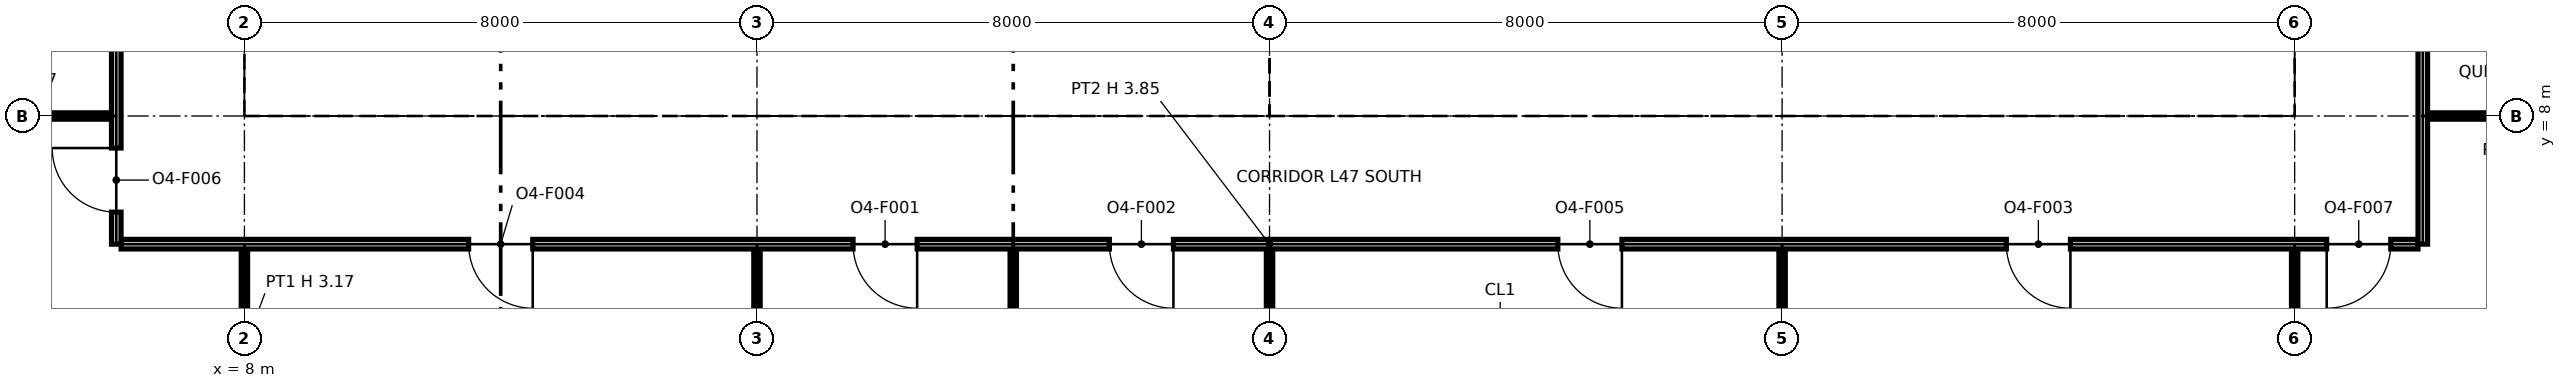
"""IFC4 building model, lengths in metres.
Left out: names, types, materials, properties, quantities, classifications, styles, units other than length and angle.
Written with IfcOpenShell. Run it as: python <this file> out.ifc"""

import sys

from ifc_helpers import new_model, si_unit, direction, frame, frame_2d, origin, origin_2d, place, context, subcontext, project, spatial, polyline, rectangle, i_section, outline, extrude, element, fill, save


model = new_model("IFC4")
c1 = context("Model", 3, precision=1e-05, world=origin(), true_north=direction((0.0, 1.0)))
c2 = subcontext(c1, "Body", "Model", "MODEL_VIEW")
j1 = project(units=[si_unit("LENGTHUNIT", "METRE"), si_unit("PLANEANGLEUNIT", "RADIAN")], contexts=[c1])
p1 = place(None, origin())
s1 = spatial("IfcSite", under=j1, at=p1, CompositionType="ELEMENT")
p2 = place(p1, origin())
s2 = spatial("IfcBuilding", under=s1, at=p2, CompositionType="ELEMENT")
p3 = place(p2, frame((0.0, 0.0, 221.0)))
s3 = spatial("IfcBuildingStorey", under=s2, at=p3, CompositionType="ELEMENT", Elevation=221.0)
for number, where, z_axis, x_axis in (
    (1, (8.0, 8.0, 0.0), (0.0, 0.0, 1.0), (1.0, 0.0, 0.0)),
    (2, (16.0, 8.0, 0.0), (0.0, 0.0, 1.0), (1.0, 0.0, 0.0)),
):
    element("IfcColumn", number, at=place(p3, frame(where, z_axis=z_axis, x_axis=x_axis)), inside=s3, PredefinedType="COLUMN", context=c2, shape_type="SweptSolid", body=[
        extrude(i_section(OverallWidth=0.373, OverallDepth=0.368, WebThickness=0.015, FlangeThickness=0.024, at=origin_2d()), origin(), (0.0, 0.0, 1.0), 3.85),
    ])
p4 = place(p3, frame((24.0, 8.0, 0.0), z_axis=(0.0, 0.0, 1.0), x_axis=(1.0, 0.0, 0.0)))
e3 = element("IfcColumn", 3, at=p4, inside=s3, PredefinedType="COLUMN", context=c2, shape_type="SweptSolid", body=[
    extrude(i_section(OverallWidth=0.394, OverallDepth=0.376, WebThickness=0.017, FlangeThickness=0.028, at=origin_2d()), origin(), (0.0, 0.0, 1.0), 3.85),
])
for number, where, z_axis, x_axis in (
    (4, (32.0, 8.0, 0.0), (0.0, 0.0, 1.0), (1.0, 0.0, 0.0)),
    (5, (40.0, 8.0, 0.0), (0.0, 0.0, 1.0), (1.0, 0.0, 0.0)),
):
    element("IfcColumn", number, at=place(p3, frame(where, z_axis=z_axis, x_axis=x_axis)), inside=s3, PredefinedType="COLUMN", context=c2, shape_type="SweptSolid", body=[
        extrude(i_section(OverallWidth=0.373, OverallDepth=0.368, WebThickness=0.015, FlangeThickness=0.024, at=origin_2d()), origin(), (0.0, 0.0, 1.0), 3.85),
    ])
p5 = place(p3, frame((8.65, 8.75, 0.0), z_axis=(0.0, 0.0, 1.0), x_axis=(1.0, 0.0, 0.0)))
e6 = element("IfcWall", 6, at=p5, inside=s3, PredefinedType="PARTITIONING", context=c2, shape_type="SweptSolid", body=[
    extrude(outline(polyline([(0.0, 0.0), (14.7, 0.0), (14.7, 3.85), (7.438, 3.85), (7.438, 3.308), (7.262, 3.308), (7.261, 3.85), (0.0, 3.85), (0.0, 0.0)])), frame((0.0, 0.1, 0.0), z_axis=(0.0, -1.0, 0.0), x_axis=(1.0, 0.0, 0.0)), (0.0, 0.0, 1.0), 0.2),
])
p6 = place(p5, frame((1.3, 0.0, 0.0)))
e7 = element("IfcOpeningElement", 7, at=p6, cuts=e6, PredefinedType="OPENING", context=c2, shape_type="SweptSolid", body=[
    extrude(rectangle(XDim=1.4, YDim=2.1, at=frame_2d((0.7, 1.05))), frame((0.0, 0.11, 0.0), z_axis=(0.0, -1.0, 0.0), x_axis=(1.0, 0.0, 0.0)), (0.0, 0.0, 1.0), 0.22),
])
p7 = place(p5, frame((4.6, 0.0, 0.0)))
e8 = element("IfcOpeningElement", 8, at=p7, cuts=e6, PredefinedType="OPENING", context=c2, shape_type="SweptSolid", body=[
    extrude(rectangle(XDim=1.4, YDim=2.1, at=frame_2d((0.7, 1.05))), frame((0.0, 0.11, 0.0), z_axis=(0.0, -1.0, 0.0), x_axis=(1.0, 0.0, 0.0)), (0.0, 0.0, 1.0), 0.22),
])
p8 = place(p5, frame((10.4, 0.0, 0.0)))
e9 = element("IfcOpeningElement", 9, at=p8, cuts=e6, PredefinedType="OPENING", context=c2, shape_type="SweptSolid", body=[
    extrude(rectangle(XDim=1.2, YDim=2.1, at=frame_2d((0.6, 1.05))), frame((0.0, 0.11, 0.0), z_axis=(0.0, -1.0, 0.0), x_axis=(1.0, 0.0, 0.0)), (0.0, 0.0, 1.0), 0.22),
])
p9 = place(p3, frame((8.75, 8.85, 0.0), z_axis=(0.0, 0.0, 1.0), x_axis=(0.0, 1.0, 0.0)))
e10 = element("IfcWall", 10, at=p9, inside=s3, PredefinedType="PARTITIONING", context=c2, shape_type="SweptSolid", body=[
    extrude(outline(polyline([(0.0, 0.0), (14.3, 0.0), (14.3, 3.85), (10.225, 3.85), (10.224, 3.44), (10.076, 3.44), (10.075, 3.85), (7.239, 3.85), (7.238, 3.308), (7.062, 3.308), (7.062, 3.85), (0.0, 3.85), (0.0, 0.0)])), frame((0.0, 0.1, 0.0), z_axis=(0.0, -1.0, 0.0), x_axis=(1.0, 0.0, 0.0)), (0.0, 0.0, 1.0), 0.2),
])
p10 = place(p9, frame((8.3, 0.0, 0.0)))
e11 = element("IfcOpeningElement", 11, at=p10, cuts=e10, PredefinedType="OPENING", context=c2, shape_type="SweptSolid", body=[
    extrude(rectangle(XDim=1.8, YDim=2.1, at=frame_2d((0.9, 1.05))), frame((0.0, 0.11, 0.0), z_axis=(0.0, -1.0, 0.0), x_axis=(1.0, 0.0, 0.0)), (0.0, 0.0, 1.0), 0.22),
])
p11 = place(p3, frame((12.4, 8.85, 0.0), z_axis=(0.0, 0.0, 1.0), x_axis=(0.0, 1.0, 0.0)))
e12 = element("IfcWall", 12, at=p11, inside=s3, PredefinedType="PARTITIONING", context=c2, shape_type="SweptSolid", body=[
    extrude(rectangle(XDim=6.85, YDim=0.2, at=frame_2d((3.425, 0.0))), origin(), (0.0, 0.0, 1.0), 3.85),
])
p12 = place(p3, frame((15.85, 8.85, 0.0), z_axis=(0.0, 0.0, 1.0), x_axis=(0.0, 1.0, 0.0)))
e13 = element("IfcWall", 13, at=p12, inside=s3, PredefinedType="PARTITIONING", context=c2, shape_type="SweptSolid", body=[
    extrude(rectangle(XDim=1.55, YDim=0.9, at=frame_2d((0.775, 0.0))), origin(), (0.0, 0.0, 1.0), 3.308),
])
p13 = place(p12, frame((0.3, 0.0, 0.0)))
e14 = element("IfcOpeningElement", 14, at=p13, cuts=e13, PredefinedType="OPENING", context=c2, shape_type="SweptSolid", body=[
    extrude(rectangle(XDim=1.1, YDim=2.1, at=frame_2d((0.55, 1.05))), frame((0.0, 0.46, 0.0), z_axis=(0.0, -1.0, 0.0), x_axis=(1.0, 0.0, 0.0)), (0.0, 0.0, 1.0), 0.92),
])
p14 = place(p3, frame((23.25, 8.85, 0.0), z_axis=(0.0, 0.0, 1.0), x_axis=(0.0, 1.0, 0.0)))
e15 = element("IfcWall", 15, at=p14, inside=s3, PredefinedType="PARTITIONING", context=c2, shape_type="SweptSolid", body=[
    extrude(outline(polyline([(0.0, 0.0), (14.3, 0.0), (14.3, 3.85), (10.225, 3.85), (10.224, 3.44), (10.076, 3.44), (10.075, 3.85), (7.239, 3.85), (7.238, 3.308), (7.062, 3.308), (7.062, 3.85), (5.225, 3.85), (5.224, 3.44), (5.076, 3.44), (5.075, 3.85), (0.0, 3.85), (0.0, 0.0)])), frame((0.0, 0.1, 0.0), z_axis=(0.0, -1.0, 0.0), x_axis=(1.0, 0.0, 0.0)), (0.0, 0.0, 1.0), 0.2),
])
p15 = place(p14, frame((8.3, 0.0, 0.0)))
e16 = element("IfcOpeningElement", 16, at=p15, cuts=e15, PredefinedType="OPENING", context=c2, shape_type="SweptSolid", body=[
    extrude(rectangle(XDim=1.8, YDim=2.1, at=frame_2d((0.9, 1.05))), frame((0.0, 0.11, 0.0), z_axis=(0.0, -1.0, 0.0), x_axis=(1.0, 0.0, 0.0)), (0.0, 0.0, 1.0), 0.22),
])
p16 = place(p3, frame((24.65, 8.75, 0.0), z_axis=(0.0, 0.0, 1.0), x_axis=(1.0, 0.0, 0.0)))
e17 = element("IfcWall", 17, at=p16, inside=s3, PredefinedType="PARTITIONING", context=c2, shape_type="SweptSolid", body=[
    extrude(outline(polyline([(0.0, 0.0), (14.7, 0.0), (14.7, 3.85), (7.438, 3.85), (7.438, 3.308), (7.262, 3.308), (7.261, 3.85), (0.0, 3.85), (0.0, 0.0)])), frame((0.0, 0.1, 0.0), z_axis=(0.0, -1.0, 0.0), x_axis=(1.0, 0.0, 0.0)), (0.0, 0.0, 1.0), 0.2),
])
p17 = place(p3, frame((24.75, 8.85, 0.0), z_axis=(0.0, 0.0, 1.0), x_axis=(0.0, 1.0, 0.0)))
e18 = element("IfcWall", 18, at=p17, inside=s3, PredefinedType="PARTITIONING", context=c2, shape_type="SweptSolid", body=[
    extrude(outline(polyline([(0.0, 0.0), (6.3, 0.0), (6.3, 3.85), (3.225, 3.85), (3.224, 3.44), (3.076, 3.44), (3.075, 3.85), (0.0, 3.85), (0.0, 0.0)])), frame((0.0, 0.1, 0.0), z_axis=(0.0, -1.0, 0.0), x_axis=(1.0, 0.0, 0.0)), (0.0, 0.0, 1.0), 0.2),
])
for number, where, z_axis, x_axis in (
    (19, (27.2, 8.85, 0.0), (0.0, 0.0, 1.0), (0.0, 1.0, 0.0)),
    (20, (29.5, 8.85, 0.0), (0.0, 0.0, 1.0), (0.0, 1.0, 0.0)),
):
    element("IfcWall", number, at=place(p3, frame(where, z_axis=z_axis, x_axis=x_axis)), inside=s3, PredefinedType="PARTITIONING", context=c2, shape_type="SweptSolid", body=[
        extrude(rectangle(XDim=2.55, YDim=0.2, at=frame_2d((1.275, 0.0))), origin(), (0.0, 0.0, 1.0), 3.85),
    ])
p18 = place(p3, frame((32.0, 8.85, 0.0), z_axis=(0.0, 0.0, 1.0), x_axis=(0.0, 1.0, 0.0)))
e21 = element("IfcWall", 21, at=p18, inside=s3, PredefinedType="PARTITIONING", context=c2, shape_type="SweptSolid", body=[
    extrude(rectangle(XDim=2.55, YDim=0.6, at=frame_2d((1.275, 0.0))), origin(), (0.0, 0.0, 1.0), 3.308),
])
for number, where, z_axis, x_axis in (
    (22, (35.6, 8.85, 0.0), (0.0, 0.0, 1.0), (0.0, 1.0, 0.0)),
    (23, (39.25, 8.85, 0.0), (0.0, 0.0, 1.0), (0.0, 1.0, 0.0)),
):
    element("IfcWall", number, at=place(p3, frame(where, z_axis=z_axis, x_axis=x_axis)), inside=s3, PredefinedType="PARTITIONING", context=c2, shape_type="SweptSolid", body=[
        extrude(rectangle(XDim=6.3, YDim=0.2, at=frame_2d((3.15, 0.0))), origin(), (0.0, 0.0, 1.0), 3.85),
    ])
p19 = place(p3, frame((20.0, 0.13, 0.0), z_axis=(0.0, 0.0, 1.0), x_axis=(0.0, 1.0, 0.0)))
e24 = element("IfcWall", 24, at=p19, inside=s3, PredefinedType="PARTITIONING", context=c2, shape_type="SweptSolid", body=[
    extrude(outline(polyline([(0.0, 0.0), (5.795, 0.0), (5.795, 3.85), (4.17, 3.85), (4.168, 3.172), (3.572, 3.172), (3.57, 3.85), (0.0, 3.85), (0.0, 0.0)])), frame((0.0, 0.05, 0.0), z_axis=(0.0, -1.0, 0.0), x_axis=(1.0, 0.0, 0.0)), (0.0, 0.0, 1.0), 0.1),
])
p20 = place(p3, frame((40.0, 0.13, 0.0), z_axis=(0.0, 0.0, 1.0), x_axis=(0.0, 1.0, 0.0)))
e25 = element("IfcWall", 25, at=p20, inside=s3, PredefinedType="PARTITIONING", context=c2, shape_type="SweptSolid", body=[
    extrude(rectangle(XDim=5.795, YDim=0.1, at=frame_2d((2.897, 0.0))), origin(), (0.0, 0.0, 1.0), 3.172),
])
for number, where, z_axis, x_axis in (
    (26, (8.0, 2.83, 0.0), (0.0, 0.0, 1.0), (0.0, 1.0, 0.0)),
    (27, (16.0, 2.83, 0.0), (0.0, 0.0, 1.0), (0.0, 1.0, 0.0)),
    (28, (24.0, 2.83, 0.0), (0.0, 0.0, 1.0), (0.0, 1.0, 0.0)),
    (29, (32.0, 2.83, 0.0), (0.0, 0.0, 1.0), (0.0, 1.0, 0.0)),
):
    element("IfcWall", number, at=place(p3, frame(where, z_axis=z_axis, x_axis=x_axis)), inside=s3, PredefinedType="PARTITIONING", context=c2, shape_type="SweptSolid", body=[
        extrude(rectangle(XDim=3.095, YDim=0.1, at=frame_2d((1.547, 0.0))), origin(), (0.0, 0.0, 1.0), 3.172),
    ])
p21 = place(p3, frame((6.075, 6.0, 0.0), z_axis=(0.0, 0.0, 1.0), x_axis=(1.0, 0.0, 0.0)))
e30 = element("IfcWall", 30, at=p21, inside=s3, PredefinedType="PARTITIONING", context=c2, shape_type="SweptSolid", body=[
    extrude(rectangle(XDim=35.85, YDim=0.15, at=frame_2d((17.925, 0.0))), origin(), (0.0, 0.0, 1.0), 3.85),
])
p22 = place(p21, frame((12.425, 0.0, 0.0), z_axis=(0.0, 0.0, 1.0), x_axis=(-1.0, 0.0, 0.0)))
e31 = element("IfcOpeningElement", 31, at=p22, cuts=e30, PredefinedType="OPENING", context=c2, shape_type="SweptSolid", body=[
    extrude(rectangle(XDim=1.0, YDim=2.1, at=frame_2d((0.5, 1.05))), frame((0.0, 0.085, 0.0), z_axis=(0.0, -1.0, 0.0), x_axis=(1.0, 0.0, 0.0)), (0.0, 0.0, 1.0), 0.17),
])
p23 = place(p21, frame((16.425, 0.0, 0.0), z_axis=(0.0, 0.0, 1.0), x_axis=(-1.0, 0.0, 0.0)))
e32 = element("IfcOpeningElement", 32, at=p23, cuts=e30, PredefinedType="OPENING", context=c2, shape_type="SweptSolid", body=[
    extrude(rectangle(XDim=1.0, YDim=2.1, at=frame_2d((0.5, 1.05))), frame((0.0, 0.085, 0.0), z_axis=(0.0, -1.0, 0.0), x_axis=(1.0, 0.0, 0.0)), (0.0, 0.0, 1.0), 0.17),
])
p24 = place(p21, frame((30.425, 0.0, 0.0), z_axis=(0.0, 0.0, 1.0), x_axis=(-1.0, 0.0, 0.0)))
e33 = element("IfcOpeningElement", 33, at=p24, cuts=e30, PredefinedType="OPENING", context=c2, shape_type="SweptSolid", body=[
    extrude(rectangle(XDim=1.0, YDim=2.1, at=frame_2d((0.5, 1.05))), frame((0.0, 0.085, 0.0), z_axis=(0.0, -1.0, 0.0), x_axis=(1.0, 0.0, 0.0)), (0.0, 0.0, 1.0), 0.17),
])
p25 = place(p21, frame((6.425, 0.0, 0.0), z_axis=(0.0, 0.0, 1.0), x_axis=(-1.0, 0.0, 0.0)))
e34 = element("IfcOpeningElement", 34, at=p25, cuts=e30, PredefinedType="OPENING", context=c2, shape_type="SweptSolid", body=[
    extrude(rectangle(XDim=1.0, YDim=2.1, at=frame_2d((0.5, 1.05))), frame((0.0, 0.085, 0.0), z_axis=(0.0, -1.0, 0.0), x_axis=(1.0, 0.0, 0.0)), (0.0, 0.0, 1.0), 0.17),
])
p26 = place(p21, frame((23.425, 0.0, 0.0), z_axis=(0.0, 0.0, 1.0), x_axis=(-1.0, 0.0, 0.0)))
e35 = element("IfcOpeningElement", 35, at=p26, cuts=e30, PredefinedType="OPENING", context=c2, shape_type="SweptSolid", body=[
    extrude(rectangle(XDim=1.0, YDim=2.1, at=frame_2d((0.5, 1.05))), frame((0.0, 0.085, 0.0), z_axis=(0.0, -1.0, 0.0), x_axis=(1.0, 0.0, 0.0)), (0.0, 0.0, 1.0), 0.17),
])
p27 = place(p21, frame((35.425, 0.0, 0.0), z_axis=(0.0, 0.0, 1.0), x_axis=(-1.0, 0.0, 0.0)))
e36 = element("IfcOpeningElement", 36, at=p27, cuts=e30, PredefinedType="OPENING", context=c2, shape_type="SweptSolid", body=[
    extrude(rectangle(XDim=1.0, YDim=2.1, at=frame_2d((0.5, 1.05))), frame((0.0, 0.085, 0.0), z_axis=(0.0, -1.0, 0.0), x_axis=(1.0, 0.0, 0.0)), (0.0, 0.0, 1.0), 0.17),
])
p28 = place(p3, frame((6.0, 6.0, 0.0), z_axis=(0.0, 0.0, 1.0), x_axis=(0.0, 1.0, 0.0)))
e37 = element("IfcWall", 37, at=p28, inside=s3, PredefinedType="PARTITIONING", context=c2, shape_type="SweptSolid", body=[
    extrude(outline(polyline([(0.0, 0.0), (13.375, 0.0), (13.375, 3.85), (10.3, 3.85), (10.298, 3.172), (9.702, 3.172), (9.7, 3.85), (6.3, 3.85), (6.298, 3.172), (5.702, 3.172), (5.7, 3.85), (2.3, 3.85), (2.298, 3.172), (1.702, 3.172), (1.7, 3.85), (0.0, 3.85), (0.0, 0.0)])), frame((0.0, 0.075, 0.0), z_axis=(0.0, -1.0, 0.0), x_axis=(1.0, 0.0, 0.0)), (0.0, 0.0, 1.0), 0.15),
])
p29 = place(p28, frame((0.5, 0.0, 0.0)))
e38 = element("IfcOpeningElement", 38, at=p29, cuts=e37, PredefinedType="OPENING", context=c2, shape_type="SweptSolid", body=[
    extrude(rectangle(XDim=1.0, YDim=2.1, at=frame_2d((0.5, 1.05))), frame((0.0, 0.085, 0.0), z_axis=(0.0, -1.0, 0.0), x_axis=(1.0, 0.0, 0.0)), (0.0, 0.0, 1.0), 0.17),
])
p30 = place(p28, frame((3.5, 0.0, 0.0)))
e39 = element("IfcOpeningElement", 39, at=p30, cuts=e37, PredefinedType="OPENING", context=c2, shape_type="SweptSolid", body=[
    extrude(rectangle(XDim=1.0, YDim=2.1, at=frame_2d((0.5, 1.05))), frame((0.0, 0.085, 0.0), z_axis=(0.0, -1.0, 0.0), x_axis=(1.0, 0.0, 0.0)), (0.0, 0.0, 1.0), 0.17),
])
p31 = place(p28, frame((7.5, 0.0, 0.0)))
e40 = element("IfcOpeningElement", 40, at=p31, cuts=e37, PredefinedType="OPENING", context=c2, shape_type="SweptSolid", body=[
    extrude(rectangle(XDim=1.0, YDim=2.1, at=frame_2d((0.5, 1.05))), frame((0.0, 0.085, 0.0), z_axis=(0.0, -1.0, 0.0), x_axis=(1.0, 0.0, 0.0)), (0.0, 0.0, 1.0), 0.17),
])
p32 = place(p28, frame((11.225, 0.0, 0.0)))
e41 = element("IfcOpeningElement", 41, at=p32, cuts=e37, PredefinedType="OPENING", context=c2, shape_type="SweptSolid", body=[
    extrude(rectangle(XDim=1.0, YDim=2.1, at=frame_2d((0.5, 1.05))), frame((0.0, 0.085, 0.0), z_axis=(0.0, -1.0, 0.0), x_axis=(1.0, 0.0, 0.0)), (0.0, 0.0, 1.0), 0.17),
])
p33 = place(p3, frame((42.0, 6.0, 0.0), z_axis=(0.0, 0.0, 1.0), x_axis=(0.0, 1.0, 0.0)))
e42 = element("IfcWall", 42, at=p33, inside=s3, PredefinedType="PARTITIONING", context=c2, shape_type="SweptSolid", body=[
    extrude(outline(polyline([(0.0, 0.0), (11.925, 0.0), (11.925, 3.85), (10.3, 3.85), (10.298, 3.172), (9.702, 3.172), (9.7, 3.85), (6.3, 3.85), (6.298, 3.172), (5.702, 3.172), (5.7, 3.85), (2.3, 3.85), (2.298, 3.172), (1.702, 3.172), (1.7, 3.85), (0.0, 3.85), (0.0, 0.0)])), frame((0.0, 0.075, 0.0), z_axis=(0.0, -1.0, 0.0), x_axis=(1.0, 0.0, 0.0)), (0.0, 0.0, 1.0), 0.15),
])
p34 = place(p33, frame((4.5, 0.0, 0.0), z_axis=(0.0, 0.0, 1.0), x_axis=(-1.0, 0.0, 0.0)))
e43 = element("IfcOpeningElement", 43, at=p34, cuts=e42, PredefinedType="OPENING", context=c2, shape_type="SweptSolid", body=[
    extrude(rectangle(XDim=1.0, YDim=2.1, at=frame_2d((0.5, 1.05))), frame((0.0, 0.085, 0.0), z_axis=(0.0, -1.0, 0.0), x_axis=(1.0, 0.0, 0.0)), (0.0, 0.0, 1.0), 0.17),
])
p35 = place(p33, frame((8.5, 0.0, 0.0), z_axis=(0.0, 0.0, 1.0), x_axis=(-1.0, 0.0, 0.0)))
e44 = element("IfcOpeningElement", 44, at=p35, cuts=e42, PredefinedType="OPENING", context=c2, shape_type="SweptSolid", body=[
    extrude(rectangle(XDim=1.0, YDim=2.1, at=frame_2d((0.5, 1.05))), frame((0.0, 0.085, 0.0), z_axis=(0.0, -1.0, 0.0), x_axis=(1.0, 0.0, 0.0)), (0.0, 0.0, 1.0), 0.17),
])
p36 = place(p33, frame((11.5, 0.0, 0.0), z_axis=(0.0, 0.0, 1.0), x_axis=(-1.0, 0.0, 0.0)))
e45 = element("IfcOpeningElement", 45, at=p36, cuts=e42, PredefinedType="OPENING", context=c2, shape_type="SweptSolid", body=[
    extrude(rectangle(XDim=1.0, YDim=2.1, at=frame_2d((0.5, 1.05))), frame((0.0, 0.085, 0.0), z_axis=(0.0, -1.0, 0.0), x_axis=(1.0, 0.0, 0.0)), (0.0, 0.0, 1.0), 0.17),
])
for number, where, z_axis, x_axis in (
    (46, (2.83, 8.0, 0.0), (0.0, 0.0, 1.0), (1.0, 0.0, 0.0)),
    (47, (42.075, 8.0, 0.0), (0.0, 0.0, 1.0), (1.0, 0.0, 0.0)),
):
    element("IfcWall", number, at=place(p3, frame(where, z_axis=z_axis, x_axis=x_axis)), inside=s3, PredefinedType="PARTITIONING", context=c2, shape_type="SweptSolid", body=[
        extrude(rectangle(XDim=3.095, YDim=0.1, at=frame_2d((1.547, 0.0))), origin(), (0.0, 0.0, 1.0), 3.172),
    ])
p37 = place(p6, origin())
e48 = element("IfcDoor", 48, at=p37, inside=s3, OperationType="DOUBLE_DOOR_SINGLE_SWING", PredefinedType="NOTDEFINED", context=c2, shape_type="SweptSolid", body=[
    extrude(rectangle(XDim=1.4, YDim=2.1, at=frame_2d((0.7, 1.05))), frame((0.0, 0.025, 0.0), z_axis=(0.0, -1.0, 0.0), x_axis=(1.0, 0.0, 0.0)), (0.0, 0.0, 1.0), 0.05),
])
fill(e7, e48)
p38 = place(p7, origin())
e49 = element("IfcDoor", 49, at=p38, inside=s3, OperationType="DOUBLE_DOOR_SINGLE_SWING", PredefinedType="NOTDEFINED", context=c2, shape_type="SweptSolid", body=[
    extrude(rectangle(XDim=1.4, YDim=2.1, at=frame_2d((0.7, 1.05))), frame((0.0, 0.025, 0.0), z_axis=(0.0, -1.0, 0.0), x_axis=(1.0, 0.0, 0.0)), (0.0, 0.0, 1.0), 0.05),
])
fill(e8, e49)
p39 = place(p8, origin())
e50 = element("IfcDoor", 50, at=p39, inside=s3, OperationType="SINGLE_SWING_LEFT", PredefinedType="NOTDEFINED", context=c2, shape_type="SweptSolid", body=[
    extrude(rectangle(XDim=1.2, YDim=2.1, at=frame_2d((0.6, 1.05))), frame((0.0, 0.025, 0.0), z_axis=(0.0, -1.0, 0.0), x_axis=(1.0, 0.0, 0.0)), (0.0, 0.0, 1.0), 0.05),
])
fill(e9, e50)
p40 = place(p22, origin())
e51 = element("IfcDoor", 51, at=p40, inside=s3, OperationType="SINGLE_SWING_LEFT", PredefinedType="DOOR", context=c2, shape_type="SweptSolid", body=[
    extrude(rectangle(XDim=1.0, YDim=2.1, at=frame_2d((0.5, 1.05))), frame((0.0, 0.025, 0.0), z_axis=(0.0, -1.0, 0.0), x_axis=(1.0, 0.0, 0.0)), (0.0, 0.0, 1.0), 0.05),
])
fill(e31, e51)
p41 = place(p23, origin())
e52 = element("IfcDoor", 52, at=p41, inside=s3, OperationType="SINGLE_SWING_LEFT", PredefinedType="DOOR", context=c2, shape_type="SweptSolid", body=[
    extrude(rectangle(XDim=1.0, YDim=2.1, at=frame_2d((0.5, 1.05))), frame((0.0, 0.025, 0.0), z_axis=(0.0, -1.0, 0.0), x_axis=(1.0, 0.0, 0.0)), (0.0, 0.0, 1.0), 0.05),
])
fill(e32, e52)
p42 = place(p24, origin())
e53 = element("IfcDoor", 53, at=p42, inside=s3, OperationType="SINGLE_SWING_LEFT", PredefinedType="DOOR", context=c2, shape_type="SweptSolid", body=[
    extrude(rectangle(XDim=1.0, YDim=2.1, at=frame_2d((0.5, 1.05))), frame((0.0, 0.025, 0.0), z_axis=(0.0, -1.0, 0.0), x_axis=(1.0, 0.0, 0.0)), (0.0, 0.0, 1.0), 0.05),
])
fill(e33, e53)
p43 = place(p25, origin())
e54 = element("IfcDoor", 54, at=p43, inside=s3, OperationType="SINGLE_SWING_LEFT", PredefinedType="DOOR", context=c2, shape_type="SweptSolid", body=[
    extrude(rectangle(XDim=1.0, YDim=2.1, at=frame_2d((0.5, 1.05))), frame((0.0, 0.025, 0.0), z_axis=(0.0, -1.0, 0.0), x_axis=(1.0, 0.0, 0.0)), (0.0, 0.0, 1.0), 0.05),
])
fill(e34, e54)
p44 = place(p26, origin())
e55 = element("IfcDoor", 55, at=p44, inside=s3, OperationType="SINGLE_SWING_LEFT", PredefinedType="DOOR", context=c2, shape_type="SweptSolid", body=[
    extrude(rectangle(XDim=1.0, YDim=2.1, at=frame_2d((0.5, 1.05))), frame((0.0, 0.025, 0.0), z_axis=(0.0, -1.0, 0.0), x_axis=(1.0, 0.0, 0.0)), (0.0, 0.0, 1.0), 0.05),
])
fill(e35, e55)
p45 = place(p29, origin())
e56 = element("IfcDoor", 56, at=p45, inside=s3, OperationType="SINGLE_SWING_RIGHT", PredefinedType="DOOR", context=c2, shape_type="SweptSolid", body=[
    extrude(rectangle(XDim=1.0, YDim=2.1, at=frame_2d((0.5, 1.05))), frame((0.0, 0.025, 0.0), z_axis=(0.0, -1.0, 0.0), x_axis=(1.0, 0.0, 0.0)), (0.0, 0.0, 1.0), 0.05),
])
fill(e38, e56)
p46 = place(p27, origin())
e57 = element("IfcDoor", 57, at=p46, inside=s3, OperationType="SINGLE_SWING_RIGHT", PredefinedType="DOOR", context=c2, shape_type="SweptSolid", body=[
    extrude(rectangle(XDim=1.0, YDim=2.1, at=frame_2d((0.5, 1.05))), frame((0.0, 0.025, 0.0), z_axis=(0.0, -1.0, 0.0), x_axis=(1.0, 0.0, 0.0)), (0.0, 0.0, 1.0), 0.05),
])
fill(e36, e57)
save(model, sys.argv[1])
